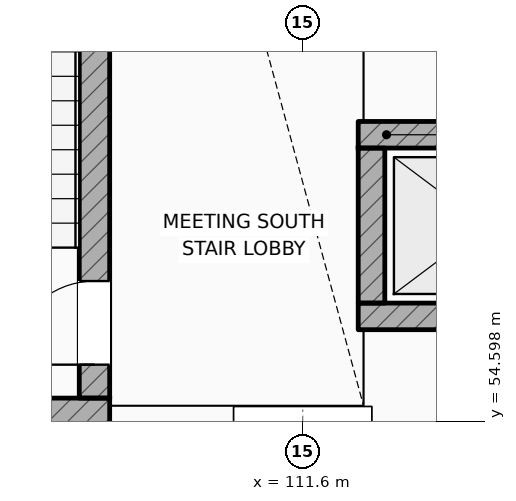
"""IFC4 building model, lengths in metres.
Left out: names, types, materials, properties, quantities, classifications, styles, units other than length and angle.
Written with IfcOpenShell. Run it as: python <this file> out.ifc"""

import sys

from ifc_helpers import new_model, si_unit, direction, frame, frame_2d, origin, place, context, subcontext, project, spatial, rectangle, extrude, element, fill, save


model = new_model("IFC4")
c1 = context("Model", 3, precision=1e-05, world=origin(), true_north=direction((0.0, 1.0)))
c2 = subcontext(c1, "Body", "Model", "MODEL_VIEW")
j1 = project(units=[si_unit("LENGTHUNIT", "METRE"), si_unit("PLANEANGLEUNIT", "RADIAN")], contexts=[c1])
p1 = place(None, origin())
s1 = spatial("IfcSite", under=j1, at=p1, CompositionType="ELEMENT")
p2 = place(p1, origin())
s2 = spatial("IfcBuilding", under=s1, at=p2, CompositionType="ELEMENT")
p3 = place(p2, frame((0.0, 0.0, -4.5)))
s3 = spatial("IfcBuildingStorey", under=s2, at=p3, CompositionType="ELEMENT", Elevation=-4.5)
p4 = place(p3, frame((104.1, 54.7, 0.0), z_axis=(0.0, 0.0, 1.0), x_axis=(1.0, 0.0, 0.0)))
e1 = element("IfcWall", 1, at=p4, inside=s3, PredefinedType="SHEAR", context=c2, shape_type="SweptSolid", body=[
    extrude(rectangle(XDim=4.96, YDim=0.4, at=frame_2d((2.48, 0.0))), origin(), (0.0, 0.0, 1.0), 4.5),
])
p5 = place(p3, frame((108.86, 54.9, 0.0), z_axis=(0.0, 0.0, 1.0), x_axis=(0.0, 1.0, 0.0)))
e2 = element("IfcWall", 2, at=p5, inside=s3, PredefinedType="SHEAR", context=c2, shape_type="SweptSolid", body=[
    extrude(rectangle(XDim=9.112, YDim=0.4, at=frame_2d((4.556, 0.0))), origin(), (0.0, 0.0, 1.0), 4.5),
])
p6 = place(p5, frame((0.44, 0.0, 0.0)))
e3 = element("IfcOpeningElement", 3, at=p6, cuts=e2, PredefinedType="OPENING", context=c2, shape_type="SweptSolid", body=[
    extrude(rectangle(XDim=1.1, YDim=2.2, at=frame_2d((0.55, 1.1))), frame((0.0, 0.21, 0.0), z_axis=(0.0, -1.0, 0.0), x_axis=(1.0, 0.0, 0.0)), (0.0, 0.0, 1.0), 0.42),
])
p7 = place(p3, frame((112.33, 58.365, 0.0), z_axis=(0.0, 0.0, 1.0), x_axis=(1.0, 0.0, 0.0)))
e4 = element("IfcWall", 4, at=p7, inside=s3, PredefinedType="SHEAR", context=c2, shape_type="SweptSolid", body=[
    extrude(rectangle(XDim=3.34, YDim=0.35, at=frame_2d((1.67, 0.0))), origin(), (0.0, 0.0, 1.0), 4.1),
])
p8 = place(p7, frame((1.045, 0.0, 0.0)))
e5 = element("IfcOpeningElement", 5, at=p8, cuts=e4, PredefinedType="OPENING", context=c2, shape_type="SweptSolid", body=[
    extrude(rectangle(XDim=1.25, YDim=2.25, at=frame_2d((0.625, 1.125))), frame((0.0, 0.185, 0.0), z_axis=(0.0, -1.0, 0.0), x_axis=(1.0, 0.0, 0.0)), (0.0, 0.0, 1.0), 0.37),
])
p9 = place(p3, frame((112.33, 55.975, 0.0), z_axis=(0.0, 0.0, 1.0), x_axis=(1.0, 0.0, 0.0)))
e6 = element("IfcWall", 6, at=p9, inside=s3, PredefinedType="SHEAR", context=c2, shape_type="SweptSolid", body=[
    extrude(rectangle(XDim=3.34, YDim=0.35, at=frame_2d((1.67, 0.0))), origin(), (0.0, 0.0, 1.0), 4.1),
])
p10 = place(p3, frame((112.505, 56.15, 0.0), z_axis=(0.0, 0.0, 1.0), x_axis=(0.0, 1.0, 0.0)))
e7 = element("IfcWall", 7, at=p10, inside=s3, PredefinedType="SHEAR", context=c2, shape_type="SweptSolid", body=[
    extrude(rectangle(XDim=2.04, YDim=0.35, at=frame_2d((1.02, 0.0))), origin(), (0.0, 0.0, 1.0), 4.1),
])
p11 = place(p6, origin())
e8 = element("IfcDoor", 8, at=p11, inside=s3, OperationType="SINGLE_SWING_LEFT", PredefinedType="DOOR", context=c2, shape_type="SweptSolid", body=[
    extrude(rectangle(XDim=1.1, YDim=2.2, at=frame_2d((0.55, 1.1))), frame((0.0, 0.025, 0.0), z_axis=(0.0, -1.0, 0.0), x_axis=(1.0, 0.0, 0.0)), (0.0, 0.0, 1.0), 0.05),
])
fill(e3, e8)
save(model, sys.argv[1])
